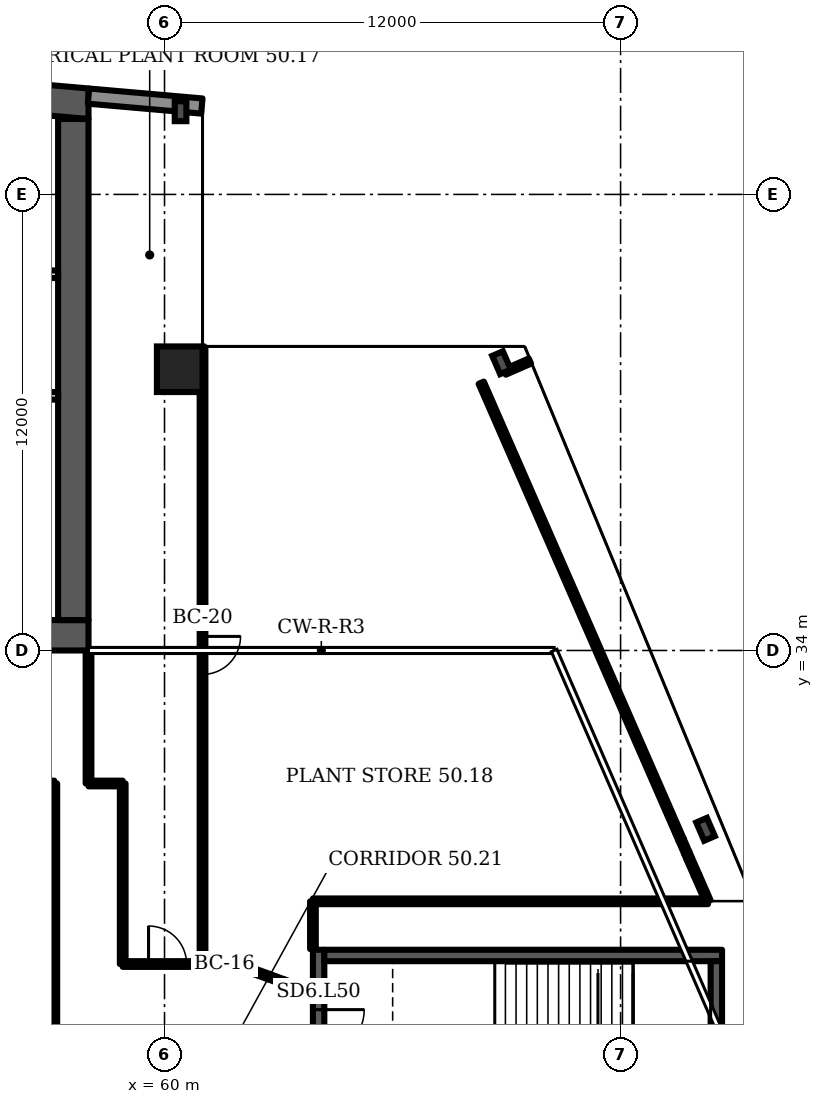
"""IFC4 building model, lengths in metres.
Left out: names, types, materials, properties, quantities, classifications, styles, units other than length and angle.
Written with IfcOpenShell. Run it as: python <this file> out.ifc"""

import sys

from ifc_helpers import new_model, si_unit, direction, frame, frame_2d, origin, origin_2d, place, context, subcontext, project, spatial, polyline, rectangle, i_section, outline, extrude, element, fill, save


model = new_model("IFC4")
c1 = context("Model", 3, precision=1e-05, world=origin(), true_north=direction((0.0, 1.0)))
c2 = subcontext(c1, "Body", "Model", "MODEL_VIEW")
j1 = project(units=[si_unit("LENGTHUNIT", "METRE"), si_unit("PLANEANGLEUNIT", "RADIAN")], contexts=[c1])
p1 = place(None, origin())
s1 = spatial("IfcSite", under=j1, at=p1, CompositionType="ELEMENT")
p2 = place(p1, origin())
s2 = spatial("IfcBuilding", under=s1, at=p2, CompositionType="ELEMENT")
p3 = place(p2, frame((0.0, 0.0, 202.3)))
s3 = spatial("IfcBuildingStorey", under=s2, at=p3, CompositionType="ELEMENT", Elevation=202.3)
p4 = place(p3, origin())
e1 = element("IfcWall", 1, at=p4, inside=s3, PredefinedType="SHEAR", context=c2, shape_type="SweptSolid", body=[
    extrude(outline(polyline([(16.0, 47.984), (37.0, 49.822), (58.0, 47.984), (58.0, 48.787), (37.0, 50.625), (16.0, 48.787), (16.0, 47.984)])), origin(), (0.0, 0.0, 1.0), 4.8),
])
p5 = place(p3, frame((16.0, 34.4, 0.0), z_axis=(0.0, 0.0, 1.0), x_axis=(1.0, 0.0, 0.0)))
e2 = element("IfcWall", 2, at=p5, inside=s3, PredefinedType="SHEAR", context=c2, shape_type="SweptSolid", body=[
    extrude(rectangle(XDim=42.0, YDim=0.8, at=frame_2d((21.0, 0.0))), origin(), (0.0, 0.0, 1.0), 4.8),
])
p6 = place(p5, frame((3.2, 0.0, 0.0)))
e3 = element("IfcOpeningElement", 3, at=p6, cuts=e2, PredefinedType="OPENING", context=c2, shape_type="SweptSolid", body=[
    extrude(rectangle(XDim=1.0, YDim=2.1, at=frame_2d((0.5, 1.05))), frame((0.0, 0.41, 0.0), z_axis=(0.0, -1.0, 0.0), x_axis=(1.0, 0.0, 0.0)), (0.0, 0.0, 1.0), 0.82),
])
p7 = place(p5, frame((7.65, 0.0, 0.0)))
e4 = element("IfcOpeningElement", 4, at=p7, cuts=e2, PredefinedType="OPENING", context=c2, shape_type="SweptSolid", body=[
    extrude(rectangle(XDim=1.2, YDim=2.1, at=frame_2d((0.6, 1.05))), frame((0.0, 0.41, 0.0), z_axis=(0.0, -1.0, 0.0), x_axis=(1.0, 0.0, 0.0)), (0.0, 0.0, 1.0), 0.82),
])
p8 = place(p5, frame((14.767, 0.0, 0.0)))
e5 = element("IfcOpeningElement", 5, at=p8, cuts=e2, PredefinedType="OPENING", context=c2, shape_type="SweptSolid", body=[
    extrude(rectangle(XDim=1.1, YDim=2.1, at=frame_2d((0.55, 1.05))), frame((0.0, 0.41, 0.0), z_axis=(0.0, -1.0, 0.0), x_axis=(1.0, 0.0, 0.0)), (0.0, 0.0, 1.0), 0.82),
])
p9 = place(p5, frame((19.133, 0.0, 0.0)))
e6 = element("IfcOpeningElement", 6, at=p9, cuts=e2, PredefinedType="OPENING", context=c2, shape_type="SweptSolid", body=[
    extrude(rectangle(XDim=1.1, YDim=2.1, at=frame_2d((0.55, 1.05))), frame((0.0, 0.41, 0.0), z_axis=(0.0, -1.0, 0.0), x_axis=(1.0, 0.0, 0.0)), (0.0, 0.0, 1.0), 0.82),
])
p10 = place(p5, frame((16.8, 0.0, 0.0)))
e7 = element("IfcOpeningElement", 7, at=p10, cuts=e2, PredefinedType="OPENING", context=c2, shape_type="SweptSolid", body=[
    extrude(rectangle(XDim=1.4, YDim=2.1, at=frame_2d((0.7, 1.05))), frame((0.0, 0.41, 0.0), z_axis=(0.0, -1.0, 0.0), x_axis=(1.0, 0.0, 0.0)), (0.0, 0.0, 1.0), 0.82),
])
p11 = place(p5, frame((21.767, 0.0, 0.0)))
e8 = element("IfcOpeningElement", 8, at=p11, cuts=e2, PredefinedType="OPENING", context=c2, shape_type="SweptSolid", body=[
    extrude(rectangle(XDim=1.1, YDim=2.1, at=frame_2d((0.55, 1.05))), frame((0.0, 0.41, 0.0), z_axis=(0.0, -1.0, 0.0), x_axis=(1.0, 0.0, 0.0)), (0.0, 0.0, 1.0), 0.82),
])
p12 = place(p5, frame((23.95, 0.0, 0.0)))
e9 = element("IfcOpeningElement", 9, at=p12, cuts=e2, PredefinedType="OPENING", context=c2, shape_type="SweptSolid", body=[
    extrude(rectangle(XDim=1.1, YDim=2.1, at=frame_2d((0.55, 1.05))), frame((0.0, 0.41, 0.0), z_axis=(0.0, -1.0, 0.0), x_axis=(1.0, 0.0, 0.0)), (0.0, 0.0, 1.0), 0.82),
])
p13 = place(p5, frame((26.133, 0.0, 0.0)))
e10 = element("IfcOpeningElement", 10, at=p13, cuts=e2, PredefinedType="OPENING", context=c2, shape_type="SweptSolid", body=[
    extrude(rectangle(XDim=1.1, YDim=2.1, at=frame_2d((0.55, 1.05))), frame((0.0, 0.41, 0.0), z_axis=(0.0, -1.0, 0.0), x_axis=(1.0, 0.0, 0.0)), (0.0, 0.0, 1.0), 0.82),
])
p14 = place(p5, frame((33.15, 0.0, 0.0)))
e11 = element("IfcOpeningElement", 11, at=p14, cuts=e2, PredefinedType="OPENING", context=c2, shape_type="SweptSolid", body=[
    extrude(rectangle(XDim=1.2, YDim=2.1, at=frame_2d((0.6, 1.05))), frame((0.0, 0.41, 0.0), z_axis=(0.0, -1.0, 0.0), x_axis=(1.0, 0.0, 0.0)), (0.0, 0.0, 1.0), 0.82),
])
p15 = place(p5, frame((37.767, 0.0, 0.0)))
e12 = element("IfcOpeningElement", 12, at=p15, cuts=e2, PredefinedType="OPENING", context=c2, shape_type="SweptSolid", body=[
    extrude(rectangle(XDim=1.4, YDim=2.1, at=frame_2d((0.7, 1.05))), frame((0.0, 0.41, 0.0), z_axis=(0.0, -1.0, 0.0), x_axis=(1.0, 0.0, 0.0)), (0.0, 0.0, 1.0), 0.82),
])
p16 = place(p3, frame((57.6, 34.8, 0.0), z_axis=(0.0, 0.0, 1.0), x_axis=(0.0, 1.0, 0.0)))
e13 = element("IfcWall", 13, at=p16, inside=s3, PredefinedType="SHEAR", context=c2, shape_type="SweptSolid", body=[
    extrude(rectangle(XDim=13.184, YDim=0.8, at=frame_2d((6.592, 0.0))), origin(), (0.0, 0.0, 1.0), 4.8),
])
p17 = place(p3, frame((60.4, 41.4, 0.0), z_axis=(0.0, 0.0, 1.0), x_axis=(1.0, 0.0, 0.0)))
e14 = element("IfcColumn", 14, at=p17, inside=s3, PredefinedType="COLUMN", context=c2, shape_type="SweptSolid", body=[
    extrude(rectangle(XDim=1.2, YDim=1.2, at=origin_2d()), origin(), (0.0, 0.0, 1.0), 4.8),
])
for number, where, z_axis, x_axis in (
    (15, (74.235, 29.295, 0.0), (0.0, 0.0, 1.0), (0.917, 0.399, 0.0)),
    (16, (68.867, 41.572, 0.0), (0.0, 0.0, 1.0), (0.917, 0.399, 0.0)),
    (17, (60.422, 48.189, 0.0), (0.0, 0.0, 1.0), (1.0, 0.0, 0.0)),
):
    element("IfcColumn", number, at=place(p3, frame(where, z_axis=z_axis, x_axis=x_axis)), inside=s3, PredefinedType="COLUMN", context=c2, shape_type="SweptSolid", body=[
        extrude(i_section(OverallWidth=0.306, OverallDepth=0.524, WebThickness=0.021, FlangeThickness=0.04, FilletRadius=0.027, at=origin_2d()), origin(), (0.0, 0.0, 1.0), 4.8),
    ])
p18 = place(p3, frame((60.983, 48.326, 0.0), z_axis=(0.0, 0.0, 1.0), x_axis=(-0.996194, 0.087168, 0.0)))
e18 = element("IfcWall", 18, at=p18, inside=s3, PredefinedType="SOLIDWALL", context=c2, shape_type="SweptSolid", body=[
    extrude(rectangle(XDim=2.994, YDim=0.4, at=frame_2d((1.497, 0.0))), origin(), (0.0, 0.0, 1.0), 4.4),
])
p19 = place(p3, frame((51.4, 40.7, 0.0), z_axis=(0.0, 0.0, 1.0), x_axis=(1.0, 0.0, 0.0)))
e19 = element("IfcWall", 19, at=p19, inside=s3, PredefinedType="PARTITIONING", context=c2, shape_type="SweptSolid", body=[
    extrude(rectangle(XDim=5.8, YDim=0.2, at=frame_2d((2.9, 0.0))), origin(), (0.0, 0.0, 1.0), 4.4),
])
p20 = place(p19, frame((0.367, 0.0, 0.0)))
e20 = element("IfcOpeningElement", 20, at=p20, cuts=e19, PredefinedType="OPENING", context=c2, shape_type="SweptSolid", body=[
    extrude(rectangle(XDim=1.1, YDim=2.1, at=frame_2d((0.55, 1.05))), frame((0.0, 0.11, 0.0), z_axis=(0.0, -1.0, 0.0), x_axis=(1.0, 0.0, 0.0)), (0.0, 0.0, 1.0), 0.22),
])
p21 = place(p19, frame((3.417, 0.0, 0.0)))
e21 = element("IfcOpeningElement", 21, at=p21, cuts=e19, PredefinedType="OPENING", context=c2, shape_type="SweptSolid", body=[
    extrude(rectangle(XDim=1.0, YDim=2.1, at=frame_2d((0.5, 1.05))), frame((0.0, 0.11, 0.0), z_axis=(0.0, -1.0, 0.0), x_axis=(1.0, 0.0, 0.0)), (0.0, 0.0, 1.0), 0.22),
])
p22 = place(p3, frame((51.4, 43.9, 0.0), z_axis=(0.0, 0.0, 1.0), x_axis=(1.0, 0.0, 0.0)))
e22 = element("IfcWall", 22, at=p22, inside=s3, PredefinedType="PARTITIONING", context=c2, shape_type="SweptSolid", body=[
    extrude(rectangle(XDim=5.8, YDim=0.2, at=frame_2d((2.9, 0.0))), origin(), (0.0, 0.0, 1.0), 4.4),
])
p23 = place(p22, frame((2.283, 0.0, 0.0)))
e23 = element("IfcOpeningElement", 23, at=p23, cuts=e22, PredefinedType="OPENING", context=c2, shape_type="SweptSolid", body=[
    extrude(rectangle(XDim=1.0, YDim=2.1, at=frame_2d((0.5, 1.05))), frame((0.0, 0.11, 0.0), z_axis=(0.0, -1.0, 0.0), x_axis=(1.0, 0.0, 0.0)), (0.0, 0.0, 1.0), 0.22),
])
p24 = place(p22, frame((4.167, 0.0, 0.0)))
e24 = element("IfcOpeningElement", 24, at=p24, cuts=e22, PredefinedType="OPENING", context=c2, shape_type="SweptSolid", body=[
    extrude(rectangle(XDim=1.0, YDim=2.1, at=frame_2d((0.5, 1.05))), frame((0.0, 0.11, 0.0), z_axis=(0.0, -1.0, 0.0), x_axis=(1.0, 0.0, 0.0)), (0.0, 0.0, 1.0), 0.22),
])
p25 = place(p3, frame((64.055, 21.725, 0.0), z_axis=(0.0, 0.0, 1.0), x_axis=(0.0, 1.0, 0.0)))
e25 = element("IfcWall", 25, at=p25, inside=s3, PredefinedType="SHEAR", context=c2, shape_type="SweptSolid", body=[
    extrude(rectangle(XDim=4.4, YDim=0.3, at=frame_2d((2.2, 0.0))), origin(), (0.0, 0.0, 1.0), 4.4),
])
p26 = place(p25, frame((1.625, 0.0, 0.0)))
e26 = element("IfcOpeningElement", 26, at=p26, cuts=e25, PredefinedType="OPENING", context=c2, shape_type="SweptSolid", body=[
    extrude(rectangle(XDim=1.2, YDim=2.1, at=frame_2d((0.6, 1.05))), frame((0.0, 0.16, 0.0), z_axis=(0.0, -1.0, 0.0), x_axis=(1.0, 0.0, 0.0)), (0.0, 0.0, 1.0), 0.32),
])
p27 = place(p3, frame((57.1, 23.95, 0.0), z_axis=(0.0, 0.0, 1.0), x_axis=(0.0, 1.0, 0.0)))
e27 = element("IfcWall", 27, at=p27, inside=s3, PredefinedType="PARTITIONING", context=c2, shape_type="SweptSolid", body=[
    extrude(rectangle(XDim=6.55, YDim=0.15, at=frame_2d((3.275, 0.0))), origin(), (0.0, 0.0, 1.0), 4.4),
])
p28 = place(p3, frame((58.0, 30.5, 0.0), z_axis=(0.0, 0.0, 1.0), x_axis=(0.0, 1.0, 0.0)))
e28 = element("IfcWall", 28, at=p28, inside=s3, PredefinedType="PARTITIONING", context=c2, shape_type="SweptSolid", body=[
    extrude(rectangle(XDim=3.48, YDim=0.15, at=frame_2d((1.74, 0.0))), origin(), (0.0, 0.0, 1.0), 4.4),
])
p29 = place(p3, frame((58.0, 30.5, 0.0), z_axis=(0.0, 0.0, 1.0), x_axis=(1.0, 0.0, 0.0)))
e29 = element("IfcWall", 29, at=p29, inside=s3, PredefinedType="PARTITIONING", context=c2, shape_type="SweptSolid", body=[
    extrude(rectangle(XDim=0.9, YDim=0.15, at=frame_2d((0.45, 0.0))), origin(), (0.0, 0.0, 1.0), 4.4),
])
p30 = place(p3, frame((58.9, 25.75, 0.0), z_axis=(0.0, 0.0, 1.0), x_axis=(0.0, 1.0, 0.0)))
e30 = element("IfcWall", 30, at=p30, inside=s3, PredefinedType="PARTITIONING", context=c2, shape_type="SweptSolid", body=[
    extrude(rectangle(XDim=4.75, YDim=0.15, at=frame_2d((2.375, 0.0))), origin(), (0.0, 0.0, 1.0), 4.4),
])
p31 = place(p3, frame((58.9, 25.75, 0.0), z_axis=(0.0, 0.0, 1.0), x_axis=(1.0, 0.0, 0.0)))
e31 = element("IfcWall", 31, at=p31, inside=s3, PredefinedType="PARTITIONING", context=c2, shape_type="SweptSolid", body=[
    extrude(rectangle(XDim=3.205, YDim=0.15, at=frame_2d((1.603, 0.0))), origin(), (0.0, 0.0, 1.0), 4.4),
])
p32 = place(p31, frame((0.68, 0.0, 0.0)))
e32 = element("IfcOpeningElement", 32, at=p32, cuts=e31, PredefinedType="OPENING", context=c2, shape_type="SweptSolid", body=[
    extrude(rectangle(XDim=1.0, YDim=2.1, at=frame_2d((0.5, 1.05))), frame((0.0, 0.085, 0.0), z_axis=(0.0, -1.0, 0.0), x_axis=(1.0, 0.0, 0.0)), (0.0, 0.0, 1.0), 0.17),
])
p33 = place(p3, frame((61.0, 25.75, 0.0), z_axis=(0.0, 0.0, 1.0), x_axis=(0.0, 1.0, 0.0)))
e33 = element("IfcWall", 33, at=p33, inside=s3, PredefinedType="PARTITIONING", context=c2, shape_type="SweptSolid", body=[
    extrude(rectangle(XDim=16.23, YDim=0.15, at=frame_2d((8.115, 0.0))), origin(), (0.0, 0.0, 1.0), 4.4),
])
p34 = place(p33, frame((7.62, 0.0, 0.0)))
e34 = element("IfcOpeningElement", 34, at=p34, cuts=e33, PredefinedType="OPENING", context=c2, shape_type="SweptSolid", body=[
    extrude(rectangle(XDim=1.0, YDim=2.1, at=frame_2d((0.5, 1.05))), frame((0.0, 0.085, 0.0), z_axis=(0.0, -1.0, 0.0), x_axis=(1.0, 0.0, 0.0)), (0.0, 0.0, 1.0), 0.17),
])
p35 = place(p3, frame((62.185, 25.62, 0.0), z_axis=(0.0, 0.0, 1.0), x_axis=(-0.524813, 0.851221, 0.0)))
e35 = element("IfcWall", 35, at=p35, inside=s3, PredefinedType="PARTITIONING", context=c2, shape_type="SweptSolid", body=[
    extrude(rectangle(XDim=0.153, YDim=0.15, at=frame_2d((0.076, 0.0))), origin(), (0.0, 0.0, 1.0), 4.4),
])
p36 = place(p3, frame((62.755, 25.415, 0.0), z_axis=(0.0, 0.0, 1.0), x_axis=(-0.940583, 0.339576, 0.0)))
e36 = element("IfcWall", 36, at=p36, inside=s3, PredefinedType="PARTITIONING", context=c2, shape_type="SweptSolid", body=[
    extrude(rectangle(XDim=0.515, YDim=0.15, at=frame_2d((0.258, 0.0))), origin(), (0.0, 0.0, 1.0), 4.4),
])
p37 = place(p3, frame((63.12, 25.28, 0.0), z_axis=(0.0, 0.0, 1.0), x_axis=(-0.937965, 0.346721, 0.0)))
e37 = element("IfcWall", 37, at=p37, inside=s3, PredefinedType="PARTITIONING", context=c2, shape_type="SweptSolid", body=[
    extrude(rectangle(XDim=0.389, YDim=0.15, at=frame_2d((0.195, 0.0))), origin(), (0.0, 0.0, 1.0), 4.4),
])
p38 = place(p3, frame((63.62, 25.1, 0.0), z_axis=(0.0, 0.0, 1.0), x_axis=(-0.940924, 0.338604, 0.0)))
e38 = element("IfcWall", 38, at=p38, inside=s3, PredefinedType="PARTITIONING", context=c2, shape_type="SweptSolid", body=[
    extrude(rectangle(XDim=0.531, YDim=0.15, at=frame_2d((0.266, 0.0))), origin(), (0.0, 0.0, 1.0), 4.4),
])
p39 = place(p3, frame((63.905, 26.145, 0.0), z_axis=(0.0, 0.0, 1.0), x_axis=(0.0, 1.0, 0.0)))
e39 = element("IfcWall", 39, at=p39, inside=s3, PredefinedType="PARTITIONING", context=c2, shape_type="SweptSolid", body=[
    extrude(rectangle(XDim=1.255, YDim=0.15, at=frame_2d((0.627, 0.0))), origin(), (0.0, 0.0, 1.0), 4.4),
])
p40 = place(p3, frame((63.905, 27.4, 0.0), z_axis=(0.0, 0.0, 1.0), x_axis=(1.0, 0.0, 0.0)))
e40 = element("IfcWall", 40, at=p40, inside=s3, PredefinedType="PARTITIONING", context=c2, shape_type="SweptSolid", body=[
    extrude(rectangle(XDim=10.395, YDim=0.15, at=frame_2d((5.198, 0.0))), origin(), (0.0, 0.0, 1.0), 4.4),
])
p41 = place(p3, frame((68.95, 41.325, 0.0), z_axis=(0.0, 0.0, 1.0), x_axis=(0.916633, 0.399722, 0.0)))
e41 = element("IfcWall", 41, at=p41, inside=s3, PredefinedType="PARTITIONING", context=c2, shape_type="SweptSolid", body=[
    extrude(rectangle(XDim=0.725, YDim=0.15, at=frame_2d((0.363, 0.0))), origin(), (0.0, 0.0, 1.0), 4.4),
])
p42 = place(p3, frame((73.489, 29.255, 0.0), z_axis=(0.0, 0.0, 1.0), x_axis=(-0.400613, 0.916248, 0.0)))
e42 = element("IfcWall", 42, at=p42, inside=s3, PredefinedType="PARTITIONING", context=c2, shape_type="SweptSolid", body=[
    extrude(rectangle(XDim=12.869, YDim=0.15, at=frame_2d((6.435, 0.0))), origin(), (0.0, 0.0, 1.0), 4.4),
])
p43 = place(p3, frame((73.595, 29.015, 0.0), z_axis=(0.0, 0.0, 1.0), x_axis=(-0.403922, 0.914795, 0.0)))
e43 = element("IfcWall", 43, at=p43, inside=s3, PredefinedType="PARTITIONING", context=c2, shape_type="SweptSolid", body=[
    extrude(rectangle(XDim=0.235, YDim=0.15, at=frame_2d((0.118, 0.0))), origin(), (0.0, 0.0, 1.0), 4.4),
])
p44 = place(p3, frame((73.74, 28.681, 0.0), z_axis=(0.0, 0.0, 1.0), x_axis=(-0.400983, 0.916087, 0.0)))
e44 = element("IfcWall", 44, at=p44, inside=s3, PredefinedType="PARTITIONING", context=c2, shape_type="SweptSolid", body=[
    extrude(rectangle(XDim=0.392, YDim=0.15, at=frame_2d((0.196, 0.0))), origin(), (0.0, 0.0, 1.0), 4.4),
])
p45 = place(p3, frame((73.81, 28.515, 0.0), z_axis=(0.0, 0.0, 1.0), x_axis=(-0.388359, 0.921507, 0.0)))
e45 = element("IfcWall", 45, at=p45, inside=s3, PredefinedType="PARTITIONING", context=c2, shape_type="SweptSolid", body=[
    extrude(rectangle(XDim=0.18, YDim=0.15, at=frame_2d((0.09, 0.0))), origin(), (0.0, 0.0, 1.0), 4.4),
])
p46 = place(p3, frame((73.995, 28.095, 0.0), z_axis=(0.0, 0.0, 1.0), x_axis=(-0.403275, 0.915083, 0.0)))
e46 = element("IfcWall", 46, at=p46, inside=s3, PredefinedType="PARTITIONING", context=c2, shape_type="SweptSolid", body=[
    extrude(rectangle(XDim=0.459, YDim=0.15, at=frame_2d((0.229, 0.0))), origin(), (0.0, 0.0, 1.0), 4.4),
])
p47 = place(p3, frame((74.3, 27.4, 0.0), z_axis=(0.0, 0.0, 1.0), x_axis=(-0.401745, 0.915747, 0.0)))
e47 = element("IfcWall", 47, at=p47, inside=s3, PredefinedType="PARTITIONING", context=c2, shape_type="SweptSolid", body=[
    extrude(rectangle(XDim=0.759, YDim=0.15, at=frame_2d((0.379, 0.0))), origin(), (0.0, 0.0, 1.0), 4.4),
])
p48 = place(p3, frame((44.15, 30.5, 0.0), z_axis=(0.0, 0.0, 1.0), x_axis=(1.0, 0.0, 0.0)))
e48 = element("IfcWall", 48, at=p48, inside=s3, PredefinedType="PARTITIONING", context=c2, shape_type="SweptSolid", body=[
    extrude(rectangle(XDim=12.95, YDim=0.15, at=frame_2d((6.475, 0.0))), origin(), (0.0, 0.0, 1.0), 4.4),
])
p49 = place(p3, frame((64.205, 25.975, 0.0), z_axis=(0.0, 0.0, 1.0), x_axis=(1.0, 0.0, 0.0)))
e49 = element("IfcWall", 49, at=p49, inside=s3, PredefinedType="SHEAR", context=c2, shape_type="SweptSolid", body=[
    extrude(rectangle(XDim=10.465, YDim=0.3, at=frame_2d((5.232, 0.0))), origin(), (0.0, 0.0, 1.0), 4.4),
])
p50 = place(p3, frame((74.52, 22.025, 0.0), z_axis=(0.0, 0.0, 1.0), x_axis=(0.0, 1.0, 0.0)))
e50 = element("IfcWall", 50, at=p50, inside=s3, PredefinedType="SHEAR", context=c2, shape_type="SweptSolid", body=[
    extrude(rectangle(XDim=3.8, YDim=0.3, at=frame_2d((1.9, 0.0))), origin(), (0.0, 0.0, 1.0), 4.4),
])
p51 = place(p26, origin())
e51 = element("IfcDoor", 51, at=p51, inside=s3, OperationType="SINGLE_SWING_RIGHT", PredefinedType="DOOR", context=c2, shape_type="SweptSolid", body=[
    extrude(rectangle(XDim=1.2, YDim=2.1, at=frame_2d((0.6, 1.05))), frame((0.0, 0.025, 0.0), z_axis=(0.0, -1.0, 0.0), x_axis=(1.0, 0.0, 0.0)), (0.0, 0.0, 1.0), 0.05),
])
fill(e26, e51)
p52 = place(p32, origin())
e52 = element("IfcDoor", 52, at=p52, inside=s3, OperationType="SINGLE_SWING_LEFT", PredefinedType="DOOR", context=c2, shape_type="SweptSolid", body=[
    extrude(rectangle(XDim=1.0, YDim=2.1, at=frame_2d((0.5, 1.05))), frame((0.0, 0.025, 0.0), z_axis=(0.0, -1.0, 0.0), x_axis=(1.0, 0.0, 0.0)), (0.0, 0.0, 1.0), 0.05),
])
fill(e32, e52)
p53 = place(p34, origin())
e53 = element("IfcDoor", 53, at=p53, inside=s3, OperationType="SINGLE_SWING_RIGHT", PredefinedType="DOOR", context=c2, shape_type="SweptSolid", body=[
    extrude(rectangle(XDim=1.0, YDim=2.1, at=frame_2d((0.5, 1.05))), frame((0.0, 0.025, 0.0), z_axis=(0.0, -1.0, 0.0), x_axis=(1.0, 0.0, 0.0)), (0.0, 0.0, 1.0), 0.05),
])
fill(e34, e53)
save(model, sys.argv[1])
